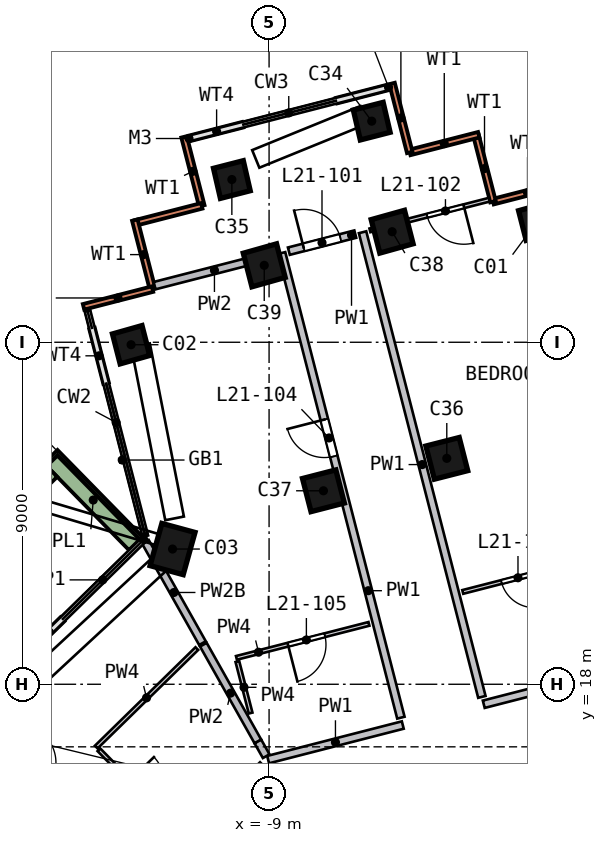
"""IFC4 building model, lengths in metres.
Left out: names, types, materials, properties, quantities, classifications, styles, units other than length and angle.
Written with IfcOpenShell. Run it as: python <this file> out.ifc"""

import sys

from ifc_helpers import new_model, si_unit, direction, frame, frame_2d, origin, origin_2d, place, context, subcontext, project, spatial, rectangle, extrude, element, fill, save


model = new_model("IFC4")
c1 = context("Model", 3, precision=1e-05, world=origin(), true_north=direction((0.0, 1.0)))
c2 = subcontext(c1, "Body", "Model", "MODEL_VIEW")
j1 = project(units=[si_unit("LENGTHUNIT", "METRE"), si_unit("PLANEANGLEUNIT", "RADIAN")], contexts=[c1])
p1 = place(None, origin())
s1 = spatial("IfcSite", under=j1, at=p1, CompositionType="ELEMENT")
p2 = place(p1, origin())
s2 = spatial("IfcBuilding", under=s1, at=p2, CompositionType="ELEMENT")
p3 = place(p2, frame((0.0, 0.0, 93.0)))
s3 = spatial("IfcBuildingStorey", under=s2, at=p3, CompositionType="ELEMENT", Elevation=93.0)
p4 = place(p3, frame((-1.821, 30.374, 0.0), z_axis=(-0.101606646, -0.15954949, 0.981947071), x_axis=(-0.26390046, 0.956015231, 0.128029)))
e1 = element("IfcColumn", 1, at=p4, inside=s3, PredefinedType="COLUMN", context=c2, shape_type="SweptSolid", body=[
    extrude(rectangle(XDim=0.8, YDim=0.8, at=origin_2d()), origin(), (0.0, 0.0, 1.0), 3.249),
])
p5 = place(p3, frame((-12.526, 27.192, 0.0), z_axis=(-0.085533768, -0.208129683, 0.97435415), x_axis=(0.268484227, -0.946577239, -0.178627405)))
e2 = element("IfcColumn", 2, at=p5, inside=s3, PredefinedType="COLUMN", context=c2, shape_type="SweptSolid", body=[
    extrude(rectangle(XDim=0.8, YDim=0.8, at=origin_2d()), origin(), (0.0, 0.0, 1.0), 3.274),
])
p6 = place(p3, frame((-11.417, 21.625, 0.0), z_axis=(-0.102392644, -0.055111111, 0.993216246), x_axis=(0.261860197, 0.961754302, 0.080361056)))
e3 = element("IfcColumn", 3, at=p6, inside=s3, PredefinedType="COLUMN", context=c2, shape_type="SweptSolid", body=[
    extrude(rectangle(XDim=1.15, YDim=0.9, at=origin_2d()), origin(), (0.0, 0.0, 1.0), 3.212),
])
p7 = place(p3, frame((-6.16, 33.038, 0.0), z_axis=(-0.113315066, -0.179135039, 0.977276999), x_axis=(-0.962594287, -0.223856191, -0.152645486)))
e4 = element("IfcColumn", 4, at=p7, inside=s3, PredefinedType="COLUMN", context=c2, shape_type="SweptSolid", body=[
    extrude(rectangle(XDim=0.8, YDim=0.8, at=origin_2d()), origin(), (0.0, 0.0, 1.0), 3.264),
])
p8 = place(p3, frame((-9.849, 31.523, 0.0), z_axis=(-0.105801171, -0.195933622, 0.97489288), x_axis=(-0.963564696, -0.222003261, -0.149189905)))
e5 = element("IfcColumn", 5, at=p8, inside=s3, PredefinedType="COLUMN", context=c2, shape_type="SweptSolid", body=[
    extrude(rectangle(XDim=0.8, YDim=0.8, at=origin_2d()), origin(), (0.0, 0.0, 1.0), 3.272),
])
for number, where, z_axis, x_axis in (
    (6, (-4.186, 23.97, 0.0), (-0.114, -0.021, 0.993), (-0.248, 0.969, -0.008)),
    (7, (-7.437, 23.135, 0.0), (-0.11, -0.036, 0.993), (-0.249, 0.968, 0.008)),
):
    element("IfcColumn", number, at=place(p3, frame(where, z_axis=z_axis, x_axis=x_axis)), inside=s3, PredefinedType="COLUMN", context=c2, shape_type="SweptSolid", body=[
        extrude(rectangle(XDim=0.9, YDim=0.9, at=origin_2d()), origin(), (0.0, 0.0, 1.0), 3.211),
    ])
p9 = place(p3, frame((-5.639, 30.126, 0.0), z_axis=(-0.09989117, -0.177001458, 0.979128305), x_axis=(-0.2665984, 0.952830564, 0.145048992)))
e8 = element("IfcColumn", 8, at=p9, inside=s3, PredefinedType="COLUMN", context=c2, shape_type="SweptSolid", body=[
    extrude(rectangle(XDim=0.9, YDim=0.9, at=origin_2d()), origin(), (0.0, 0.0, 1.0), 3.258),
])
p10 = place(p3, frame((-9.01, 29.261, 0.0), z_axis=(-0.095530524, -0.192257049, 0.976683749), x_axis=(-0.267803977, 0.949959811, 0.160802323)))
e9 = element("IfcColumn", 9, at=p10, inside=s3, PredefinedType="COLUMN", context=c2, shape_type="SweptSolid", body=[
    extrude(rectangle(XDim=0.9, YDim=0.9, at=origin_2d()), origin(), (0.0, 0.0, 1.0), 3.266),
])
p11 = place(p3, frame((-1.291, 31.165, 0.0), z_axis=(0.0, 0.0, 1.0), x_axis=(-0.968583492, -0.248688597, 0.0)))
e10 = element("IfcWall", 10, at=p11, inside=s3, PredefinedType="SOLIDWALL", context=c2, shape_type="SweptSolid", body=[
    extrude(rectangle(XDim=1.875, YDim=0.15, at=frame_2d((0.938, 0.0))), origin(), (0.0, 0.0, 1.0), 3.19),
])
p12 = place(p3, frame((-3.107, 30.699, 0.0), z_axis=(0.0, 0.0, 1.0), x_axis=(-0.248593961, 0.968607786, 0.0)))
e11 = element("IfcWall", 11, at=p12, inside=s3, PredefinedType="SOLIDWALL", context=c2, shape_type="SweptSolid", body=[
    extrude(rectangle(XDim=1.8, YDim=0.15, at=frame_2d((0.9, 0.0))), origin(), (0.0, 0.0, 1.0), 3.19),
])
for number, where, z_axis, x_axis in (
    (12, (-3.482, 32.461, 0.0), (0.0, 0.0, 1.0), (-0.969, -0.249, 0.0)),
    (13, (-5.298, 31.995, 0.0), (0.0, 0.0, 1.0), (-0.249, 0.969, 0.0)),
):
    element("IfcWall", number, at=place(p3, frame(where, z_axis=z_axis, x_axis=x_axis)), inside=s3, PredefinedType="SOLIDWALL", context=c2, shape_type="SweptSolid", body=[
        extrude(rectangle(XDim=1.875, YDim=0.15, at=frame_2d((0.938, 0.0))), origin(), (0.0, 0.0, 1.0), 3.19),
    ])
p13 = place(p3, frame((-11.237, 32.406, 0.0), z_axis=(0.0, 0.0, 1.0), x_axis=(0.248719963, -0.968575438, 0.0)))
e14 = element("IfcWall", 14, at=p13, inside=s3, PredefinedType="SOLIDWALL", context=c2, shape_type="SweptSolid", body=[
    extrude(rectangle(XDim=1.875, YDim=0.15, at=frame_2d((0.938, 0.0))), origin(), (0.0, 0.0, 1.0), 3.19),
])
p14 = place(p3, frame((-10.771, 30.59, 0.0), z_axis=(0.0, 0.0, 1.0), x_axis=(-0.968566731, -0.24875387, 0.0)))
e15 = element("IfcWall", 15, at=p14, inside=s3, PredefinedType="SOLIDWALL", context=c2, shape_type="SweptSolid", body=[
    extrude(rectangle(XDim=1.8, YDim=0.15, at=frame_2d((0.9, 0.0))), origin(), (0.0, 0.0, 1.0), 3.19),
])
p15 = place(p3, frame((-12.533, 30.215, 0.0), z_axis=(0.0, 0.0, 1.0), x_axis=(0.248688597, -0.968583492, 0.0)))
e16 = element("IfcWall", 16, at=p15, inside=s3, PredefinedType="SOLIDWALL", context=c2, shape_type="SweptSolid", body=[
    extrude(rectangle(XDim=1.875, YDim=0.15, at=frame_2d((0.938, 0.0))), origin(), (0.0, 0.0, 1.0), 3.19),
])
p16 = place(p3, frame((-12.067, 28.399, 0.0), z_axis=(0.0, 0.0, 1.0), x_axis=(-0.968575438, -0.248719963, 0.0)))
e17 = element("IfcWall", 17, at=p16, inside=s3, PredefinedType="SOLIDWALL", context=c2, shape_type="SweptSolid", body=[
    extrude(rectangle(XDim=1.875, YDim=0.15, at=frame_2d((0.938, 0.0))), origin(), (0.0, 0.0, 1.0), 3.19),
])
p17 = place(p3, frame((-5.896, 33.7, 0.0), z_axis=(0.0, 0.0, 1.0), x_axis=(-0.968607935, -0.248593378, 0.0)))
e18 = element("IfcWall", 18, at=p17, inside=s3, PredefinedType="SOLIDWALL", context=c2, shape_type="SweptSolid", body=[
    extrude(rectangle(XDim=1.374, YDim=0.15, at=frame_2d((0.687, 0.0))), origin(), (0.0, 0.0, 1.0), 2.425),
])
p18 = place(p3, frame((-9.693, 32.725, 0.0), z_axis=(0.0, 0.0, 1.0), x_axis=(-0.968606568, -0.248598704, 0.0)))
e19 = element("IfcWall", 19, at=p18, inside=s3, PredefinedType="SOLIDWALL", context=c2, shape_type="SweptSolid", body=[
    extrude(rectangle(XDim=1.42, YDim=0.15, at=frame_2d((0.71, 0.0))), origin(), (0.0, 0.0, 1.0), 2.425),
])
p19 = place(p3, frame((-13.66, 27.365, 0.0), z_axis=(0.0, 0.0, 1.0), x_axis=(0.248852246, -0.96854146, 0.0)))
e20 = element("IfcWall", 20, at=p19, inside=s3, PredefinedType="SOLIDWALL", context=c2, shape_type="SweptSolid", body=[
    extrude(rectangle(XDim=1.49, YDim=0.15, at=frame_2d((0.745, 0.0))), origin(), (0.0, 0.0, 1.0), 2.425),
])
p20 = place(p3, frame((-14.438, 19.71, 0.0), z_axis=(0.0, 0.0, 1.0), x_axis=(-0.714445304, -0.699691295, 0.0)))
e21 = element("IfcWall", 21, at=p20, inside=s3, PredefinedType="SOLIDWALL", context=c2, shape_type="SweptSolid", body=[
    extrude(rectangle(XDim=3.475, YDim=0.15, at=frame_2d((1.737, 0.0))), origin(), (0.0, 0.0, 1.0), 2.425),
])
p21 = place(p20, frame((0.4, 0.0, 0.0)))
e22 = element("IfcOpeningElement", 22, at=p21, cuts=e21, PredefinedType="OPENING", context=c2, shape_type="SweptSolid", body=[
    extrude(rectangle(XDim=2.4, YDim=2.4, at=frame_2d((1.2, 1.2))), frame((0.0, 0.085, 0.0), z_axis=(0.0, -1.0, 0.0), x_axis=(1.0, 0.0, 0.0)), (0.0, 0.0, 1.0), 0.17),
])
p22 = place(p3, frame((-12.508, 21.706, 0.0), z_axis=(0.0, 0.0, 1.0), x_axis=(-0.699665376, 0.714470686, 0.0)))
e23 = element("IfcWall", 23, at=p22, inside=s3, PredefinedType="SOLIDWALL", context=c2, shape_type="SweptSolid", body=[
    extrude(rectangle(XDim=3.199, YDim=0.5, at=frame_2d((1.6, 0.0))), origin(), (0.0, 0.0, 1.0), 0.7),
])
p23 = place(p3, frame((-14.75, 23.638, 0.0), z_axis=(0.0, 0.0, 1.0), x_axis=(-0.714471394, -0.699664653, 0.0)))
e24 = element("IfcWall", 24, at=p23, inside=s3, PredefinedType="SOLIDWALL", context=c2, shape_type="SweptSolid", body=[
    extrude(rectangle(XDim=13.224, YDim=0.5, at=frame_2d((6.612, 0.0))), origin(), (0.0, 0.0, 1.0), 0.7),
])
p24 = place(p3, frame((-15.824, 9.359, 0.0), z_axis=(0.0, 0.0, 1.0), x_axis=(0.714458026, 0.699678304, 0.0)))
e25 = element("IfcWall", 25, at=p24, inside=s3, PredefinedType="SOLIDWALL", context=c2, shape_type="SweptSolid", body=[
    extrude(rectangle(XDim=9.316, YDim=0.2, at=frame_2d((4.658, 0.0))), origin(), (0.0, 0.0, 1.0), 3.19),
])
p25 = place(p24, frame((1.9, 0.0, 0.0)))
e26 = element("IfcOpeningElement", 26, at=p25, cuts=e25, PredefinedType="OPENING", context=c2, shape_type="SweptSolid", body=[
    extrude(rectangle(XDim=1.0, YDim=2.1, at=frame_2d((0.5, 1.05))), frame((0.0, 0.11, 0.0), z_axis=(0.0, -1.0, 0.0), x_axis=(1.0, 0.0, 0.0)), (0.0, 0.0, 1.0), 0.22),
])
p26 = place(p3, frame((-8.479, 29.397, 0.0), z_axis=(0.0, 0.0, 1.0), x_axis=(0.96860289, 0.248613037, 0.0)))
e27 = element("IfcWall", 27, at=p26, inside=s3, PredefinedType="SOLIDWALL", context=c2, shape_type="SweptSolid", body=[
    extrude(rectangle(XDim=1.804, YDim=0.2, at=frame_2d((0.902, 0.0))), origin(), (0.0, 0.0, 1.0), 3.19),
])
p27 = place(p26, frame((0.4, 0.0, 0.0)))
e28 = element("IfcOpeningElement", 28, at=p27, cuts=e27, PredefinedType="OPENING", context=c2, shape_type="SweptSolid", body=[
    extrude(rectangle(XDim=1.0, YDim=2.1, at=frame_2d((0.5, 1.05))), frame((0.0, 0.11, 0.0), z_axis=(0.0, -1.0, 0.0), x_axis=(1.0, 0.0, 0.0)), (0.0, 0.0, 1.0), 0.22),
])
p28 = place(p3, frame((-5.482, 16.927, 0.0), z_axis=(0.0, 0.0, 1.0), x_axis=(-0.968576117, -0.24871732, 0.0)))
e29 = element("IfcWall", 29, at=p28, inside=s3, PredefinedType="SOLIDWALL", context=c2, shape_type="SweptSolid", body=[
    extrude(rectangle(XDim=3.658, YDim=0.2, at=frame_2d((1.829, 0.0))), origin(), (0.0, 0.0, 1.0), 3.19),
])
p29 = place(p3, frame((-5.531, 17.121, 0.0), z_axis=(0.0, 0.0, 1.0), x_axis=(-0.24868755, 0.968583761, 0.0)))
e30 = element("IfcWall", 30, at=p29, inside=s3, PredefinedType="SOLIDWALL", context=c2, shape_type="SweptSolid", body=[
    extrude(rectangle(XDim=12.624, YDim=0.2, at=frame_2d((6.312, 0.0))), origin(), (0.0, 0.0, 1.0), 3.19),
])
p30 = place(p29, frame((7.1, 0.0, 0.0)))
e31 = element("IfcOpeningElement", 31, at=p30, cuts=e30, PredefinedType="OPENING", context=c2, shape_type="SweptSolid", body=[
    extrude(rectangle(XDim=1.0, YDim=2.1, at=frame_2d((0.5, 1.05))), frame((0.0, 0.11, 0.0), z_axis=(0.0, -1.0, 0.0), x_axis=(1.0, 0.0, 0.0)), (0.0, 0.0, 1.0), 0.22),
])
p31 = place(p3, frame((-3.401, 17.668, 0.0), z_axis=(0.0, 0.0, 1.0), x_axis=(-0.24868755, 0.968583761, 0.0)))
e32 = element("IfcWall", 32, at=p31, inside=s3, PredefinedType="SOLIDWALL", context=c2, shape_type="SweptSolid", body=[
    extrude(rectangle(XDim=12.624, YDim=0.2, at=frame_2d((6.312, 0.0))), origin(), (0.0, 0.0, 1.0), 3.19),
])
p32 = place(p3, frame((-0.058, 18.32, 0.0), z_axis=(0.0, 0.0, 1.0), x_axis=(-0.968589847, -0.248663847, 0.0)))
e33 = element("IfcWall", 33, at=p32, inside=s3, PredefinedType="SOLIDWALL", context=c2, shape_type="SweptSolid", body=[
    extrude(rectangle(XDim=3.4, YDim=0.2, at=frame_2d((1.7, 0.0))), origin(), (0.0, 0.0, 1.0), 3.19),
])
p33 = place(p3, frame((-10.752, 19.082, 0.0), z_axis=(0.0, 0.0, 1.0), x_axis=(-0.490847997, 0.871245226, 0.0)))
e34 = element("IfcWall", 34, at=p33, inside=s3, PredefinedType="SOLIDWALL", context=c2, shape_type="SweptSolid", body=[
    extrude(rectangle(XDim=3.062, YDim=0.2, at=frame_2d((1.531, 0.0))), origin(), (0.0, 0.0, 1.0), 2.69),
])
p34 = place(p3, frame((-8.863, 29.299, 0.0), z_axis=(0.0, 0.0, 1.0), x_axis=(-0.968595286, -0.248642659, 0.0)))
e35 = element("IfcWall", 35, at=p34, inside=s3, PredefinedType="SOLIDWALL", context=c2, shape_type="SweptSolid", body=[
    extrude(rectangle(XDim=3.252, YDim=0.2, at=frame_2d((1.626, 0.0))), origin(), (0.0, 0.0, 1.0), 3.19),
])
p35 = place(p3, frame((-9.294, 16.494, 0.0), z_axis=(0.0, 0.0, 1.0), x_axis=(-0.490843734, 0.871247628, 0.0)))
e36 = element("IfcWall", 36, at=p35, inside=s3, PredefinedType="SOLIDWALL", context=c2, shape_type="SweptSolid", body=[
    extrude(rectangle(XDim=2.925, YDim=0.2, at=frame_2d((1.462, 0.0))), origin(), (0.0, 0.0, 1.0), 3.19),
])
p36 = place(p3, frame((-9.076, 16.107, 0.0), z_axis=(0.0, 0.0, 1.0), x_axis=(-0.491331889, 0.870972431, 0.0)))
e37 = element("IfcWall", 37, at=p36, inside=s3, PredefinedType="SOLIDWALL", context=c2, shape_type="SweptSolid", body=[
    extrude(rectangle(XDim=0.444, YDim=0.2, at=frame_2d((0.222, 0.0))), origin(), (0.0, 0.0, 1.0), 3.19),
])
p37 = place(p3, frame((-16.868, 17.225, 0.0), z_axis=(0.0, 0.0, 1.0), x_axis=(0.699684325, -0.71445213, 0.0)))
e38 = element("IfcWall", 38, at=p37, inside=s3, PredefinedType="PARTITIONING", context=c2, shape_type="SweptSolid", body=[
    extrude(rectangle(XDim=6.15, YDim=0.1, at=frame_2d((3.075, 0.0))), origin(), (0.0, 0.0, 1.0), 3.19),
])
p38 = place(p37, frame((1.8, 0.0, 0.0)))
e39 = element("IfcOpeningElement", 39, at=p38, cuts=e38, PredefinedType="OPENING", context=c2, shape_type="SweptSolid", body=[
    extrude(rectangle(XDim=1.0, YDim=2.1, at=frame_2d((0.5, 1.05))), frame((0.0, 0.06, 0.0), z_axis=(0.0, -1.0, 0.0), x_axis=(1.0, 0.0, 0.0)), (0.0, 0.0, 1.0), 0.12),
])
p39 = place(p3, frame((-13.478, 16.276, 0.0), z_axis=(0.0, 0.0, 1.0), x_axis=(0.699664998, -0.714471056, 0.0)))
e40 = element("IfcWall", 40, at=p39, inside=s3, PredefinedType="PARTITIONING", context=c2, shape_type="SweptSolid", body=[
    extrude(rectangle(XDim=3.1, YDim=0.1, at=frame_2d((1.55, 0.0))), origin(), (0.0, 0.0, 1.0), 3.19),
])
p40 = place(p39, frame((1.15, 0.0, 0.0)))
e41 = element("IfcOpeningElement", 41, at=p40, cuts=e40, PredefinedType="OPENING", context=c2, shape_type="SweptSolid", body=[
    extrude(rectangle(XDim=0.9, YDim=2.1, at=frame_2d((0.45, 1.05))), frame((0.0, 0.06, 0.0), z_axis=(0.0, -1.0, 0.0), x_axis=(1.0, 0.0, 0.0)), (0.0, 0.0, 1.0), 0.12),
])
p41 = place(p3, frame((-10.901, 18.939, 0.0), z_axis=(0.0, 0.0, 1.0), x_axis=(-0.714515918, -0.699619184, 0.0)))
e42 = element("IfcWall", 42, at=p41, inside=s3, PredefinedType="PARTITIONING", context=c2, shape_type="SweptSolid", body=[
    extrude(rectangle(XDim=3.704, YDim=0.1, at=frame_2d((1.852, 0.0))), origin(), (0.0, 0.0, 1.0), 3.19),
])
p42 = place(p3, frame((-9.486, 17.242, 0.0), z_axis=(0.0, 0.0, 1.0), x_axis=(-0.248610566, 0.968603524, 0.0)))
e43 = element("IfcWall", 43, at=p42, inside=s3, PredefinedType="PARTITIONING", context=c2, shape_type="SweptSolid", body=[
    extrude(rectangle(XDim=1.398, YDim=0.1, at=frame_2d((0.699, 0.0))), origin(), (0.0, 0.0, 1.0), 3.19),
])
p43 = place(p3, frame((-6.372, 19.589, 0.0), z_axis=(0.0, 0.0, 1.0), x_axis=(-0.968583069, -0.248690247, 0.0)))
e44 = element("IfcWall", 44, at=p43, inside=s3, PredefinedType="PARTITIONING", context=c2, shape_type="SweptSolid", body=[
    extrude(rectangle(XDim=3.6, YDim=0.1, at=frame_2d((1.8, 0.0))), origin(), (0.0, 0.0, 1.0), 3.19),
])
p44 = place(p43, frame((1.2, 0.0, 0.0)))
e45 = element("IfcOpeningElement", 45, at=p44, cuts=e44, PredefinedType="OPENING", context=c2, shape_type="SweptSolid", body=[
    extrude(rectangle(XDim=1.0, YDim=2.1, at=frame_2d((0.5, 1.05))), frame((0.0, 0.06, 0.0), z_axis=(0.0, -1.0, 0.0), x_axis=(1.0, 0.0, 0.0)), (0.0, 0.0, 1.0), 0.12),
])
p45 = place(p3, frame((-3.197, 30.754, 0.0), z_axis=(0.0, 0.0, 1.0), x_axis=(-0.968577204, -0.248713089, 0.0)))
e46 = element("IfcWall", 46, at=p45, inside=s3, PredefinedType="PARTITIONING", context=c2, shape_type="SweptSolid", body=[
    extrude(rectangle(XDim=3.252, YDim=0.1, at=frame_2d((1.626, 0.0))), origin(), (0.0, 0.0, 1.0), 3.19),
])
p46 = place(p45, frame((0.7, 0.0, 0.0)))
e47 = element("IfcOpeningElement", 47, at=p46, cuts=e46, PredefinedType="OPENING", context=c2, shape_type="SweptSolid", body=[
    extrude(rectangle(XDim=1.0, YDim=2.1, at=frame_2d((0.5, 1.05))), frame((0.0, 0.06, 0.0), z_axis=(0.0, -1.0, 0.0), x_axis=(1.0, 0.0, 0.0)), (0.0, 0.0, 1.0), 0.12),
])
p47 = place(p3, frame((-0.804, 21.225, 0.0), z_axis=(0.0, 0.0, 1.0), x_axis=(-0.968579095, -0.248705722, 0.0)))
e48 = element("IfcWall", 48, at=p47, inside=s3, PredefinedType="PARTITIONING", context=c2, shape_type="SweptSolid", body=[
    extrude(rectangle(XDim=3.2, YDim=0.1, at=frame_2d((1.6, 0.0))), origin(), (0.0, 0.0, 1.0), 3.19),
])
p48 = place(p47, frame((1.25, 0.0, 0.0)))
e49 = element("IfcOpeningElement", 49, at=p48, cuts=e48, PredefinedType="OPENING", context=c2, shape_type="SweptSolid", body=[
    extrude(rectangle(XDim=0.9, YDim=2.1, at=frame_2d((0.45, 1.05))), frame((0.0, 0.06, 0.0), z_axis=(0.0, -1.0, 0.0), x_axis=(1.0, 0.0, 0.0)), (0.0, 0.0, 1.0), 0.12),
])
p49 = place(p21, origin())
e50 = element("IfcDoor", 50, at=p49, inside=s3, OperationType="SLIDING_TO_RIGHT", PredefinedType="DOOR", context=c2, shape_type="SweptSolid", body=[
    extrude(rectangle(XDim=2.4, YDim=2.4, at=frame_2d((1.2, 1.2))), frame((0.0, 0.025, 0.0), z_axis=(0.0, -1.0, 0.0), x_axis=(1.0, 0.0, 0.0)), (0.0, 0.0, 1.0), 0.05),
])
fill(e22, e50)
p50 = place(p27, origin())
e51 = element("IfcDoor", 51, at=p50, inside=s3, OperationType="SINGLE_SWING_LEFT", PredefinedType="DOOR", context=c2, shape_type="SweptSolid", body=[
    extrude(rectangle(XDim=1.0, YDim=2.1, at=frame_2d((0.5, 1.05))), frame((0.0, 0.025, 0.0), z_axis=(0.0, -1.0, 0.0), x_axis=(1.0, 0.0, 0.0)), (0.0, 0.0, 1.0), 0.05),
])
fill(e28, e51)
p51 = place(p46, origin())
e52 = element("IfcDoor", 52, at=p51, inside=s3, OperationType="SINGLE_SWING_LEFT", PredefinedType="DOOR", context=c2, shape_type="SweptSolid", body=[
    extrude(rectangle(XDim=1.0, YDim=2.1, at=frame_2d((0.5, 1.05))), frame((0.0, 0.025, 0.0), z_axis=(0.0, -1.0, 0.0), x_axis=(1.0, 0.0, 0.0)), (0.0, 0.0, 1.0), 0.05),
])
fill(e47, e52)
p52 = place(p48, origin())
e53 = element("IfcDoor", 53, at=p52, inside=s3, OperationType="SINGLE_SWING_LEFT", PredefinedType="DOOR", context=c2, shape_type="SweptSolid", body=[
    extrude(rectangle(XDim=0.9, YDim=2.1, at=frame_2d((0.45, 1.05))), frame((0.0, 0.025, 0.0), z_axis=(0.0, -1.0, 0.0), x_axis=(1.0, 0.0, 0.0)), (0.0, 0.0, 1.0), 0.05),
])
fill(e49, e53)
p53 = place(p30, origin())
e54 = element("IfcDoor", 54, at=p53, inside=s3, OperationType="SINGLE_SWING_RIGHT", PredefinedType="DOOR", context=c2, shape_type="SweptSolid", body=[
    extrude(rectangle(XDim=1.0, YDim=2.1, at=frame_2d((0.5, 1.05))), frame((0.0, 0.025, 0.0), z_axis=(0.0, -1.0, 0.0), x_axis=(1.0, 0.0, 0.0)), (0.0, 0.0, 1.0), 0.05),
])
fill(e31, e54)
p54 = place(p44, origin())
e55 = element("IfcDoor", 55, at=p54, inside=s3, OperationType="SINGLE_SWING_RIGHT", PredefinedType="DOOR", context=c2, shape_type="SweptSolid", body=[
    extrude(rectangle(XDim=1.0, YDim=2.1, at=frame_2d((0.5, 1.05))), frame((0.0, 0.025, 0.0), z_axis=(0.0, -1.0, 0.0), x_axis=(1.0, 0.0, 0.0)), (0.0, 0.0, 1.0), 0.05),
])
fill(e45, e55)
save(model, sys.argv[1])
